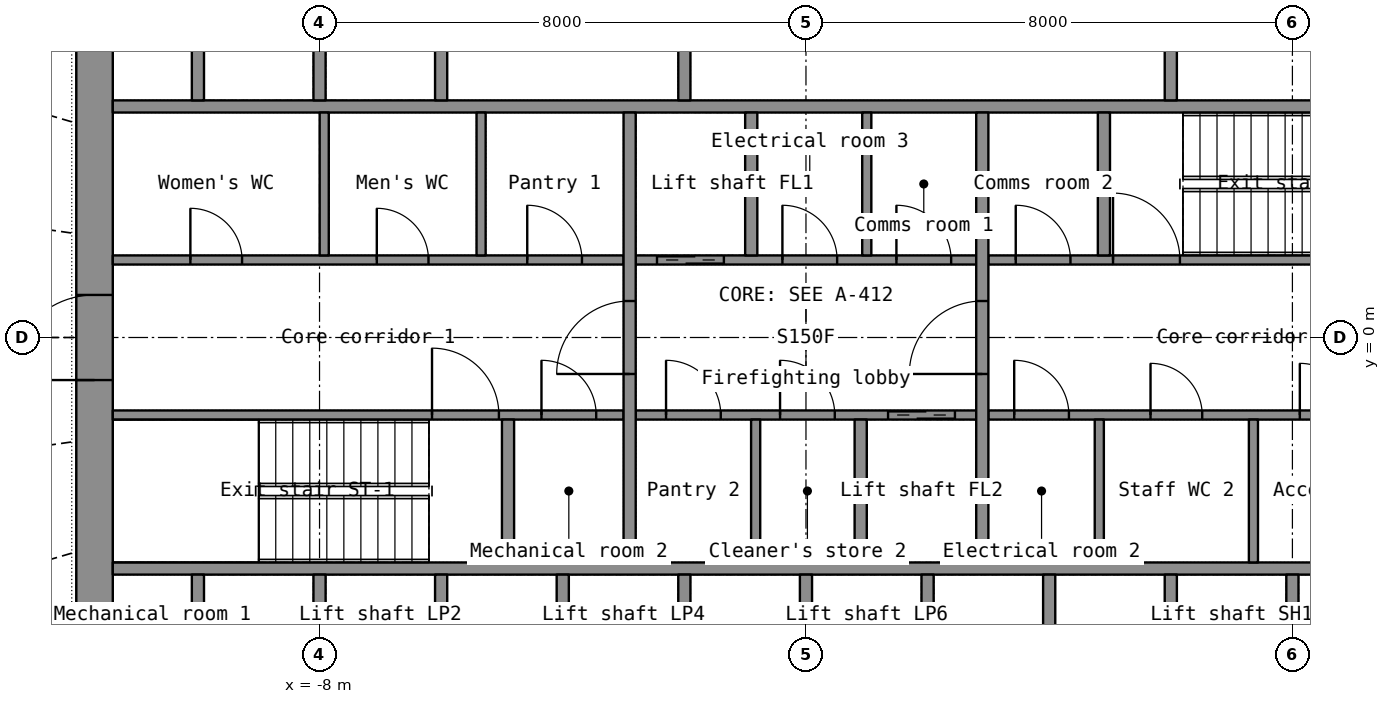
"""IFC4 building model, lengths in metres.
Left out: names, types, materials, properties, quantities, classifications, styles, units other than length and angle.
Written with IfcOpenShell. Run it as: python <this file> out.ifc"""

import sys

from ifc_helpers import new_model, si_unit, direction, frame, frame_2d, origin, place, context, subcontext, project, spatial, rectangle, extrude, element, fill, save


model = new_model("IFC4")
c1 = context("Model", 3, precision=1e-05, world=origin(), true_north=direction((0.0, 1.0)))
c2 = subcontext(c1, "Body", "Model", "MODEL_VIEW")
j1 = project(units=[si_unit("LENGTHUNIT", "METRE"), si_unit("PLANEANGLEUNIT", "RADIAN")], contexts=[c1])
p1 = place(None, origin())
s1 = spatial("IfcSite", under=j1, at=p1, CompositionType="ELEMENT")
p2 = place(p1, origin())
s2 = spatial("IfcBuilding", under=s1, at=p2, CompositionType="ELEMENT")
p3 = place(p2, frame((0.0, 0.0, 81.5)))
s3 = spatial("IfcBuildingStorey", under=s2, at=p3, CompositionType="ELEMENT", Elevation=81.5)
p4 = place(p3, frame((-11.7, -7.2, 0.0), z_axis=(0.0, 0.0, 1.0), x_axis=(0.0, 1.0, 0.0)))
e1 = element("IfcWall", 1, at=p4, inside=s3, PredefinedType="SHEAR", context=c2, shape_type="SweptSolid", body=[
    extrude(rectangle(XDim=14.4, YDim=0.6, at=frame_2d((7.2, 0.0))), origin(), (0.0, 0.0, 1.0), 3.3),
])
p5 = place(p4, frame((6.5, 0.0, 0.0)))
e2 = element("IfcOpeningElement", 2, at=p5, cuts=e1, PredefinedType="OPENING", context=c2, shape_type="SweptSolid", body=[
    extrude(rectangle(XDim=1.4, YDim=2.2, at=frame_2d((0.7, 1.1))), frame((0.0, 0.31, 0.0), z_axis=(0.0, -1.0, 0.0), x_axis=(1.0, 0.0, 0.0)), (0.0, 0.0, 1.0), 0.62),
])
for number, where, z_axis, x_axis in (
    (3, (-11.4, -3.8, 0.0), (0.0, 0.0, 1.0), (1.0, 0.0, 0.0)),
    (4, (-11.4, 3.8, 0.0), (0.0, 0.0, 1.0), (1.0, 0.0, 0.0)),
):
    element("IfcWall", number, at=place(p3, frame(where, z_axis=z_axis, x_axis=x_axis)), inside=s3, PredefinedType="SHEAR", context=c2, shape_type="SweptSolid", body=[
        extrude(rectangle(XDim=22.8, YDim=0.2, at=frame_2d((11.4, 0.0))), origin(), (0.0, 0.0, 1.0), 3.3),
    ])
for number, where, z_axis, x_axis in (
    (5, (-10.0, -6.6, 0.0), (0.0, 0.0, 1.0), (0.0, 1.0, 0.0)),
    (6, (-8.0, -6.6, 0.0), (0.0, 0.0, 1.0), (0.0, 1.0, 0.0)),
    (7, (-6.0, -6.6, 0.0), (0.0, 0.0, 1.0), (0.0, 1.0, 0.0)),
    (8, (-4.0, -6.6, 0.0), (0.0, 0.0, 1.0), (0.0, 1.0, 0.0)),
    (9, (-2.0, -6.6, 0.0), (0.0, 0.0, 1.0), (0.0, 1.0, 0.0)),
    (10, (0.0, -6.6, 0.0), (0.0, 0.0, 1.0), (0.0, 1.0, 0.0)),
    (11, (2.0, -6.6, 0.0), (0.0, 0.0, 1.0), (0.0, 1.0, 0.0)),
    (12, (4.0, -6.6, 0.0), (0.0, 0.0, 1.0), (0.0, 1.0, 0.0)),
    (13, (6.0, -6.6, 0.0), (0.0, 0.0, 1.0), (0.0, 1.0, 0.0)),
    (14, (8.0, -6.6, 0.0), (0.0, 0.0, 1.0), (0.0, 1.0, 0.0)),
    (15, (-10.0, 3.9, 0.0), (0.0, 0.0, 1.0), (0.0, 1.0, 0.0)),
    (16, (-8.0, 3.9, 0.0), (0.0, 0.0, 1.0), (0.0, 1.0, 0.0)),
    (17, (-6.0, 3.9, 0.0), (0.0, 0.0, 1.0), (0.0, 1.0, 0.0)),
):
    element("IfcWall", number, at=place(p3, frame(where, z_axis=z_axis, x_axis=x_axis)), inside=s3, PredefinedType="SHEAR", context=c2, shape_type="SweptSolid", body=[
        extrude(rectangle(XDim=2.7, YDim=0.2, at=frame_2d((1.35, 0.0))), origin(), (0.0, 0.0, 1.0), 3.3),
    ])
for number, where, z_axis, x_axis in (
    (18, (-2.0, 3.9, 0.0), (0.0, 0.0, 1.0), (0.0, 1.0, 0.0)),
    (19, (6.0, 3.9, 0.0), (0.0, 0.0, 1.0), (0.0, 1.0, 0.0)),
):
    element("IfcWall", number, at=place(p3, frame(where, z_axis=z_axis, x_axis=x_axis)), inside=s3, PredefinedType="PARTITIONING", context=c2, shape_type="SweptSolid", body=[
        extrude(rectangle(XDim=2.7, YDim=0.2, at=frame_2d((1.35, 0.0))), origin(), (0.0, 0.0, 1.0), 3.3),
    ])
p6 = place(p3, frame((-11.4, -1.275, 0.0), z_axis=(0.0, 0.0, 1.0), x_axis=(1.0, 0.0, 0.0)))
e20 = element("IfcWall", 20, at=p6, inside=s3, PredefinedType="SHEAR", context=c2, shape_type="SweptSolid", body=[
    extrude(rectangle(XDim=8.4, YDim=0.15, at=frame_2d((4.2, 0.0))), origin(), (0.0, 0.0, 1.0), 3.3),
])
p7 = place(p6, frame((5.25, 0.0, 0.0)))
e21 = element("IfcOpeningElement", 21, at=p7, cuts=e20, PredefinedType="OPENING", context=c2, shape_type="SweptSolid", body=[
    extrude(rectangle(XDim=1.1, YDim=2.15, at=frame_2d((0.55, 1.075))), frame((0.0, 0.085, 0.0), z_axis=(0.0, -1.0, 0.0), x_axis=(1.0, 0.0, 0.0)), (0.0, 0.0, 1.0), 0.17),
])
p8 = place(p6, frame((7.05, 0.0, 0.0)))
e22 = element("IfcOpeningElement", 22, at=p8, cuts=e20, PredefinedType="OPENING", context=c2, shape_type="SweptSolid", body=[
    extrude(rectangle(XDim=0.9, YDim=2.1, at=frame_2d((0.45, 1.05))), frame((0.0, 0.085, 0.0), z_axis=(0.0, -1.0, 0.0), x_axis=(1.0, 0.0, 0.0)), (0.0, 0.0, 1.0), 0.17),
])
p9 = place(p3, frame((-2.8, -1.275, 0.0), z_axis=(0.0, 0.0, 1.0), x_axis=(1.0, 0.0, 0.0)))
e23 = element("IfcWall", 23, at=p9, inside=s3, PredefinedType="SHEAR", context=c2, shape_type="SweptSolid", body=[
    extrude(rectangle(XDim=5.6, YDim=0.15, at=frame_2d((2.8, 0.0))), origin(), (0.0, 0.0, 1.0), 3.3),
])
p10 = place(p9, frame((4.15, 0.0, 0.0)))
e24 = element("IfcOpeningElement", 24, at=p10, cuts=e23, PredefinedType="OPENING", context=c2, shape_type="SweptSolid", body=[
    extrude(rectangle(XDim=1.1, YDim=2.2, at=frame_2d((0.55, 1.1))), frame((0.0, 0.085, 0.0), z_axis=(0.0, -1.0, 0.0), x_axis=(1.0, 0.0, 0.0)), (0.0, 0.0, 1.0), 0.17),
])
p11 = place(p9, frame((0.499, 0.0, 0.0)))
e25 = element("IfcOpeningElement", 25, at=p11, cuts=e23, PredefinedType="OPENING", context=c2, shape_type="SweptSolid", body=[
    extrude(rectangle(XDim=0.9, YDim=2.1, at=frame_2d((0.45, 1.05))), frame((0.0, 0.085, 0.0), z_axis=(0.0, -1.0, 0.0), x_axis=(1.0, 0.0, 0.0)), (0.0, 0.0, 1.0), 0.17),
])
p12 = place(p9, frame((2.374, 0.0, 0.0)))
e26 = element("IfcOpeningElement", 26, at=p12, cuts=e23, PredefinedType="OPENING", context=c2, shape_type="SweptSolid", body=[
    extrude(rectangle(XDim=0.9, YDim=2.1, at=frame_2d((0.45, 1.05))), frame((0.0, 0.085, 0.0), z_axis=(0.0, -1.0, 0.0), x_axis=(1.0, 0.0, 0.0)), (0.0, 0.0, 1.0), 0.17),
])
p13 = place(p3, frame((3.0, -1.275, 0.0), z_axis=(0.0, 0.0, 1.0), x_axis=(1.0, 0.0, 0.0)))
e27 = element("IfcWall", 27, at=p13, inside=s3, PredefinedType="PARTITIONING", context=c2, shape_type="SweptSolid", body=[
    extrude(rectangle(XDim=8.4, YDim=0.15, at=frame_2d((4.2, 0.0))), origin(), (0.0, 0.0, 1.0), 3.3),
])
p14 = place(p13, frame((0.425, 0.0, 0.0)))
e28 = element("IfcOpeningElement", 28, at=p14, cuts=e27, PredefinedType="OPENING", context=c2, shape_type="SweptSolid", body=[
    extrude(rectangle(XDim=0.9, YDim=2.1, at=frame_2d((0.45, 1.05))), frame((0.0, 0.085, 0.0), z_axis=(0.0, -1.0, 0.0), x_axis=(1.0, 0.0, 0.0)), (0.0, 0.0, 1.0), 0.17),
])
p15 = place(p13, frame((2.667, 0.0, 0.0)))
e29 = element("IfcOpeningElement", 29, at=p15, cuts=e27, PredefinedType="OPENING", context=c2, shape_type="SweptSolid", body=[
    extrude(rectangle(XDim=0.85, YDim=2.1, at=frame_2d((0.425, 1.05))), frame((0.0, 0.085, 0.0), z_axis=(0.0, -1.0, 0.0), x_axis=(1.0, 0.0, 0.0)), (0.0, 0.0, 1.0), 0.17),
])
p16 = place(p13, frame((5.122, 0.0, 0.0)))
e30 = element("IfcOpeningElement", 30, at=p16, cuts=e27, PredefinedType="OPENING", context=c2, shape_type="SweptSolid", body=[
    extrude(rectangle(XDim=0.85, YDim=2.1, at=frame_2d((0.425, 1.05))), frame((0.0, 0.085, 0.0), z_axis=(0.0, -1.0, 0.0), x_axis=(1.0, 0.0, 0.0)), (0.0, 0.0, 1.0), 0.17),
])
p17 = place(p13, frame((7.155, 0.0, 0.0)))
e31 = element("IfcOpeningElement", 31, at=p17, cuts=e27, PredefinedType="OPENING", context=c2, shape_type="SweptSolid", body=[
    extrude(rectangle(XDim=0.9, YDim=2.1, at=frame_2d((0.45, 1.05))), frame((0.0, 0.085, 0.0), z_axis=(0.0, -1.0, 0.0), x_axis=(1.0, 0.0, 0.0)), (0.0, 0.0, 1.0), 0.17),
])
p18 = place(p3, frame((-11.4, 1.275, 0.0), z_axis=(0.0, 0.0, 1.0), x_axis=(1.0, 0.0, 0.0)))
e32 = element("IfcWall", 32, at=p18, inside=s3, PredefinedType="PARTITIONING", context=c2, shape_type="SweptSolid", body=[
    extrude(rectangle(XDim=8.4, YDim=0.15, at=frame_2d((4.2, 0.0))), origin(), (0.0, 0.0, 1.0), 3.3),
])
p19 = place(p18, frame((1.276, 0.0, 0.0)))
e33 = element("IfcOpeningElement", 33, at=p19, cuts=e32, PredefinedType="OPENING", context=c2, shape_type="SweptSolid", body=[
    extrude(rectangle(XDim=0.85, YDim=2.1, at=frame_2d((0.425, 1.05))), frame((0.0, 0.085, 0.0), z_axis=(0.0, -1.0, 0.0), x_axis=(1.0, 0.0, 0.0)), (0.0, 0.0, 1.0), 0.17),
])
p20 = place(p18, frame((4.342, 0.0, 0.0)))
e34 = element("IfcOpeningElement", 34, at=p20, cuts=e32, PredefinedType="OPENING", context=c2, shape_type="SweptSolid", body=[
    extrude(rectangle(XDim=0.85, YDim=2.1, at=frame_2d((0.425, 1.05))), frame((0.0, 0.085, 0.0), z_axis=(0.0, -1.0, 0.0), x_axis=(1.0, 0.0, 0.0)), (0.0, 0.0, 1.0), 0.17),
])
p21 = place(p18, frame((6.816, 0.0, 0.0)))
e35 = element("IfcOpeningElement", 35, at=p21, cuts=e32, PredefinedType="OPENING", context=c2, shape_type="SweptSolid", body=[
    extrude(rectangle(XDim=0.9, YDim=2.1, at=frame_2d((0.45, 1.05))), frame((0.0, 0.085, 0.0), z_axis=(0.0, -1.0, 0.0), x_axis=(1.0, 0.0, 0.0)), (0.0, 0.0, 1.0), 0.17),
])
p22 = place(p3, frame((-2.8, 1.275, 0.0), z_axis=(0.0, 0.0, 1.0), x_axis=(1.0, 0.0, 0.0)))
e36 = element("IfcWall", 36, at=p22, inside=s3, PredefinedType="SHEAR", context=c2, shape_type="SweptSolid", body=[
    extrude(rectangle(XDim=5.6, YDim=0.15, at=frame_2d((2.8, 0.0))), origin(), (0.0, 0.0, 1.0), 3.3),
])
p23 = place(p22, frame((0.35, 0.0, 0.0)))
e37 = element("IfcOpeningElement", 37, at=p23, cuts=e36, PredefinedType="OPENING", context=c2, shape_type="SweptSolid", body=[
    extrude(rectangle(XDim=1.1, YDim=2.2, at=frame_2d((0.55, 1.1))), frame((0.0, 0.085, 0.0), z_axis=(0.0, -1.0, 0.0), x_axis=(1.0, 0.0, 0.0)), (0.0, 0.0, 1.0), 0.17),
])
p24 = place(p22, frame((2.413, 0.0, 0.0)))
e38 = element("IfcOpeningElement", 38, at=p24, cuts=e36, PredefinedType="OPENING", context=c2, shape_type="SweptSolid", body=[
    extrude(rectangle(XDim=0.9, YDim=2.1, at=frame_2d((0.45, 1.05))), frame((0.0, 0.085, 0.0), z_axis=(0.0, -1.0, 0.0), x_axis=(1.0, 0.0, 0.0)), (0.0, 0.0, 1.0), 0.17),
])
p25 = place(p22, frame((4.288, 0.0, 0.0)))
e39 = element("IfcOpeningElement", 39, at=p25, cuts=e36, PredefinedType="OPENING", context=c2, shape_type="SweptSolid", body=[
    extrude(rectangle(XDim=0.9, YDim=2.1, at=frame_2d((0.45, 1.05))), frame((0.0, 0.085, 0.0), z_axis=(0.0, -1.0, 0.0), x_axis=(1.0, 0.0, 0.0)), (0.0, 0.0, 1.0), 0.17),
])
p26 = place(p3, frame((3.0, 1.275, 0.0), z_axis=(0.0, 0.0, 1.0), x_axis=(1.0, 0.0, 0.0)))
e40 = element("IfcWall", 40, at=p26, inside=s3, PredefinedType="SHEAR", context=c2, shape_type="SweptSolid", body=[
    extrude(rectangle(XDim=8.4, YDim=0.15, at=frame_2d((4.2, 0.0))), origin(), (0.0, 0.0, 1.0), 3.3),
])
p27 = place(p26, frame((2.05, 0.0, 0.0)))
e41 = element("IfcOpeningElement", 41, at=p27, cuts=e40, PredefinedType="OPENING", context=c2, shape_type="SweptSolid", body=[
    extrude(rectangle(XDim=1.1, YDim=2.15, at=frame_2d((0.55, 1.075))), frame((0.0, 0.085, 0.0), z_axis=(0.0, -1.0, 0.0), x_axis=(1.0, 0.0, 0.0)), (0.0, 0.0, 1.0), 0.17),
])
p28 = place(p26, frame((0.45, 0.0, 0.0)))
e42 = element("IfcOpeningElement", 42, at=p28, cuts=e40, PredefinedType="OPENING", context=c2, shape_type="SweptSolid", body=[
    extrude(rectangle(XDim=0.9, YDim=2.1, at=frame_2d((0.45, 1.05))), frame((0.0, 0.085, 0.0), z_axis=(0.0, -1.0, 0.0), x_axis=(1.0, 0.0, 0.0)), (0.0, 0.0, 1.0), 0.17),
])
p29 = place(p3, frame((-2.9, -3.7, 0.0), z_axis=(0.0, 0.0, 1.0), x_axis=(0.0, 1.0, 0.0)))
e43 = element("IfcWall", 43, at=p29, inside=s3, PredefinedType="SHEAR", context=c2, shape_type="SweptSolid", body=[
    extrude(rectangle(XDim=7.4, YDim=0.2, at=frame_2d((3.7, 0.0))), origin(), (0.0, 0.0, 1.0), 3.3),
])
p30 = place(p29, frame((3.1, 0.0, 0.0)))
e44 = element("IfcOpeningElement", 44, at=p30, cuts=e43, PredefinedType="OPENING", context=c2, shape_type="SweptSolid", body=[
    extrude(rectangle(XDim=1.2, YDim=2.2, at=frame_2d((0.6, 1.1))), frame((0.0, 0.11, 0.0), z_axis=(0.0, -1.0, 0.0), x_axis=(1.0, 0.0, 0.0)), (0.0, 0.0, 1.0), 0.22),
])
p31 = place(p3, frame((2.9, -3.7, 0.0), z_axis=(0.0, 0.0, 1.0), x_axis=(0.0, 1.0, 0.0)))
e45 = element("IfcWall", 45, at=p31, inside=s3, PredefinedType="SHEAR", context=c2, shape_type="SweptSolid", body=[
    extrude(rectangle(XDim=7.4, YDim=0.2, at=frame_2d((3.7, 0.0))), origin(), (0.0, 0.0, 1.0), 3.3),
])
p32 = place(p31, frame((3.1, 0.0, 0.0)))
e46 = element("IfcOpeningElement", 46, at=p32, cuts=e45, PredefinedType="OPENING", context=c2, shape_type="SweptSolid", body=[
    extrude(rectangle(XDim=1.2, YDim=2.2, at=frame_2d((0.6, 1.1))), frame((0.0, 0.11, 0.0), z_axis=(0.0, -1.0, 0.0), x_axis=(1.0, 0.0, 0.0)), (0.0, 0.0, 1.0), 0.22),
])
for number, where, z_axis, x_axis in (
    (47, (-0.9, 1.35, 0.0), (0.0, 0.0, 1.0), (0.0, 1.0, 0.0)),
    (48, (0.9, -3.7, 0.0), (0.0, 0.0, 1.0), (0.0, 1.0, 0.0)),
    (49, (-4.9, -3.7, 0.0), (0.0, 0.0, 1.0), (0.0, 1.0, 0.0)),
    (50, (4.9, 1.35, 0.0), (0.0, 0.0, 1.0), (0.0, 1.0, 0.0)),
):
    element("IfcWall", number, at=place(p3, frame(where, z_axis=z_axis, x_axis=x_axis)), inside=s3, PredefinedType="SHEAR", context=c2, shape_type="SweptSolid", body=[
        extrude(rectangle(XDim=2.35, YDim=0.2, at=frame_2d((1.175, 0.0))), origin(), (0.0, 0.0, 1.0), 3.3),
    ])
for number, where, z_axis, x_axis in (
    (51, (-7.923, 1.35, 0.0), (0.0, 0.0, 1.0), (0.0, 1.0, 0.0)),
    (52, (-5.343, 1.35, 0.0), (0.0, 0.0, 1.0), (0.0, 1.0, 0.0)),
    (53, (4.824, -3.7, 0.0), (0.0, 0.0, 1.0), (0.0, 1.0, 0.0)),
    (54, (7.359, -3.7, 0.0), (0.0, 0.0, 1.0), (0.0, 1.0, 0.0)),
    (55, (1.0, 1.35, 0.0), (0.0, 0.0, 1.0), (0.0, 1.0, 0.0)),
    (56, (-0.827, -3.7, 0.0), (0.0, 0.0, 1.0), (0.0, 1.0, 0.0)),
):
    element("IfcWall", number, at=place(p3, frame(where, z_axis=z_axis, x_axis=x_axis)), inside=s3, PredefinedType="PARTITIONING", context=c2, shape_type="SweptSolid", body=[
        extrude(rectangle(XDim=2.35, YDim=0.15, at=frame_2d((1.175, 0.0))), origin(), (0.0, 0.0, 1.0), 3.3),
    ])
p33 = place(p5, origin())
e57 = element("IfcDoor", 57, at=p33, inside=s3, OperationType="DOUBLE_DOOR_SINGLE_SWING", PredefinedType="DOOR", context=c2, shape_type="SweptSolid", body=[
    extrude(rectangle(XDim=1.4, YDim=2.2, at=frame_2d((0.7, 1.1))), frame((0.0, 0.025, 0.0), z_axis=(0.0, -1.0, 0.0), x_axis=(1.0, 0.0, 0.0)), (0.0, 0.0, 1.0), 0.05),
])
fill(e2, e57)
p34 = place(p30, origin())
e58 = element("IfcDoor", 58, at=p34, inside=s3, OperationType="SINGLE_SWING_LEFT", PredefinedType="DOOR", context=c2, shape_type="SweptSolid", body=[
    extrude(rectangle(XDim=1.2, YDim=2.2, at=frame_2d((0.6, 1.1))), frame((0.0, 0.025, 0.0), z_axis=(0.0, -1.0, 0.0), x_axis=(1.0, 0.0, 0.0)), (0.0, 0.0, 1.0), 0.05),
])
fill(e44, e58)
p35 = place(p32, origin())
e59 = element("IfcDoor", 59, at=p35, inside=s3, OperationType="SINGLE_SWING_LEFT", PredefinedType="DOOR", context=c2, shape_type="SweptSolid", body=[
    extrude(rectangle(XDim=1.2, YDim=2.2, at=frame_2d((0.6, 1.1))), frame((0.0, 0.025, 0.0), z_axis=(0.0, -1.0, 0.0), x_axis=(1.0, 0.0, 0.0)), (0.0, 0.0, 1.0), 0.05),
])
fill(e46, e59)
p36 = place(p23, origin())
e60 = element("IfcDoor", 60, at=p36, inside=s3, OperationType="DOUBLE_DOOR_SLIDING", PredefinedType="DOOR", context=c2, shape_type="SweptSolid", body=[
    extrude(rectangle(XDim=1.1, YDim=2.2, at=frame_2d((0.55, 1.1))), frame((0.0, 0.025, 0.0), z_axis=(0.0, -1.0, 0.0), x_axis=(1.0, 0.0, 0.0)), (0.0, 0.0, 1.0), 0.05),
])
fill(e37, e60)
p37 = place(p10, origin())
e61 = element("IfcDoor", 61, at=p37, inside=s3, OperationType="DOUBLE_DOOR_SLIDING", PredefinedType="DOOR", context=c2, shape_type="SweptSolid", body=[
    extrude(rectangle(XDim=1.1, YDim=2.2, at=frame_2d((0.55, 1.1))), frame((0.0, 0.025, 0.0), z_axis=(0.0, -1.0, 0.0), x_axis=(1.0, 0.0, 0.0)), (0.0, 0.0, 1.0), 0.05),
])
fill(e24, e61)
p38 = place(p7, origin())
e62 = element("IfcDoor", 62, at=p38, inside=s3, OperationType="SINGLE_SWING_LEFT", PredefinedType="DOOR", context=c2, shape_type="SweptSolid", body=[
    extrude(rectangle(XDim=1.1, YDim=2.15, at=frame_2d((0.55, 1.075))), frame((0.0, 0.025, 0.0), z_axis=(0.0, -1.0, 0.0), x_axis=(1.0, 0.0, 0.0)), (0.0, 0.0, 1.0), 0.05),
])
fill(e21, e62)
p39 = place(p27, origin())
e63 = element("IfcDoor", 63, at=p39, inside=s3, OperationType="SINGLE_SWING_LEFT", PredefinedType="DOOR", context=c2, shape_type="SweptSolid", body=[
    extrude(rectangle(XDim=1.1, YDim=2.15, at=frame_2d((0.55, 1.075))), frame((0.0, 0.025, 0.0), z_axis=(0.0, -1.0, 0.0), x_axis=(1.0, 0.0, 0.0)), (0.0, 0.0, 1.0), 0.05),
])
fill(e41, e63)
p40 = place(p19, origin())
e64 = element("IfcDoor", 64, at=p40, inside=s3, OperationType="SINGLE_SWING_LEFT", PredefinedType="DOOR", context=c2, shape_type="SweptSolid", body=[
    extrude(rectangle(XDim=0.85, YDim=2.1, at=frame_2d((0.425, 1.05))), frame((0.0, 0.025, 0.0), z_axis=(0.0, -1.0, 0.0), x_axis=(1.0, 0.0, 0.0)), (0.0, 0.0, 1.0), 0.05),
])
fill(e33, e64)
p41 = place(p20, origin())
e65 = element("IfcDoor", 65, at=p41, inside=s3, OperationType="SINGLE_SWING_LEFT", PredefinedType="DOOR", context=c2, shape_type="SweptSolid", body=[
    extrude(rectangle(XDim=0.85, YDim=2.1, at=frame_2d((0.425, 1.05))), frame((0.0, 0.025, 0.0), z_axis=(0.0, -1.0, 0.0), x_axis=(1.0, 0.0, 0.0)), (0.0, 0.0, 1.0), 0.05),
])
fill(e34, e65)
p42 = place(p21, origin())
e66 = element("IfcDoor", 66, at=p42, inside=s3, OperationType="SINGLE_SWING_LEFT", PredefinedType="DOOR", context=c2, shape_type="SweptSolid", body=[
    extrude(rectangle(XDim=0.9, YDim=2.1, at=frame_2d((0.45, 1.05))), frame((0.0, 0.025, 0.0), z_axis=(0.0, -1.0, 0.0), x_axis=(1.0, 0.0, 0.0)), (0.0, 0.0, 1.0), 0.05),
])
fill(e35, e66)
p43 = place(p14, origin())
e67 = element("IfcDoor", 67, at=p43, inside=s3, OperationType="SINGLE_SWING_LEFT", PredefinedType="DOOR", context=c2, shape_type="SweptSolid", body=[
    extrude(rectangle(XDim=0.9, YDim=2.1, at=frame_2d((0.45, 1.05))), frame((0.0, 0.025, 0.0), z_axis=(0.0, -1.0, 0.0), x_axis=(1.0, 0.0, 0.0)), (0.0, 0.0, 1.0), 0.05),
])
fill(e28, e67)
p44 = place(p15, origin())
e68 = element("IfcDoor", 68, at=p44, inside=s3, OperationType="SINGLE_SWING_LEFT", PredefinedType="DOOR", context=c2, shape_type="SweptSolid", body=[
    extrude(rectangle(XDim=0.85, YDim=2.1, at=frame_2d((0.425, 1.05))), frame((0.0, 0.025, 0.0), z_axis=(0.0, -1.0, 0.0), x_axis=(1.0, 0.0, 0.0)), (0.0, 0.0, 1.0), 0.05),
])
fill(e29, e68)
p45 = place(p16, origin())
e69 = element("IfcDoor", 69, at=p45, inside=s3, OperationType="SINGLE_SWING_LEFT", PredefinedType="DOOR", context=c2, shape_type="SweptSolid", body=[
    extrude(rectangle(XDim=0.85, YDim=2.1, at=frame_2d((0.425, 1.05))), frame((0.0, 0.025, 0.0), z_axis=(0.0, -1.0, 0.0), x_axis=(1.0, 0.0, 0.0)), (0.0, 0.0, 1.0), 0.05),
])
fill(e30, e69)
p46 = place(p24, origin())
e70 = element("IfcDoor", 70, at=p46, inside=s3, OperationType="SINGLE_SWING_LEFT", PredefinedType="DOOR", context=c2, shape_type="SweptSolid", body=[
    extrude(rectangle(XDim=0.9, YDim=2.1, at=frame_2d((0.45, 1.05))), frame((0.0, 0.025, 0.0), z_axis=(0.0, -1.0, 0.0), x_axis=(1.0, 0.0, 0.0)), (0.0, 0.0, 1.0), 0.05),
])
fill(e38, e70)
p47 = place(p25, origin())
e71 = element("IfcDoor", 71, at=p47, inside=s3, OperationType="SINGLE_SWING_LEFT", PredefinedType="DOOR", context=c2, shape_type="SweptSolid", body=[
    extrude(rectangle(XDim=0.9, YDim=2.1, at=frame_2d((0.45, 1.05))), frame((0.0, 0.025, 0.0), z_axis=(0.0, -1.0, 0.0), x_axis=(1.0, 0.0, 0.0)), (0.0, 0.0, 1.0), 0.05),
])
fill(e39, e71)
p48 = place(p11, origin())
e72 = element("IfcDoor", 72, at=p48, inside=s3, OperationType="SINGLE_SWING_LEFT", PredefinedType="DOOR", context=c2, shape_type="SweptSolid", body=[
    extrude(rectangle(XDim=0.9, YDim=2.1, at=frame_2d((0.45, 1.05))), frame((0.0, 0.025, 0.0), z_axis=(0.0, -1.0, 0.0), x_axis=(1.0, 0.0, 0.0)), (0.0, 0.0, 1.0), 0.05),
])
fill(e25, e72)
p49 = place(p12, origin())
e73 = element("IfcDoor", 73, at=p49, inside=s3, OperationType="SINGLE_SWING_LEFT", PredefinedType="DOOR", context=c2, shape_type="SweptSolid", body=[
    extrude(rectangle(XDim=0.9, YDim=2.1, at=frame_2d((0.45, 1.05))), frame((0.0, 0.025, 0.0), z_axis=(0.0, -1.0, 0.0), x_axis=(1.0, 0.0, 0.0)), (0.0, 0.0, 1.0), 0.05),
])
fill(e26, e73)
p50 = place(p28, origin())
e74 = element("IfcDoor", 74, at=p50, inside=s3, OperationType="SINGLE_SWING_LEFT", PredefinedType="DOOR", context=c2, shape_type="SweptSolid", body=[
    extrude(rectangle(XDim=0.9, YDim=2.1, at=frame_2d((0.45, 1.05))), frame((0.0, 0.025, 0.0), z_axis=(0.0, -1.0, 0.0), x_axis=(1.0, 0.0, 0.0)), (0.0, 0.0, 1.0), 0.05),
])
fill(e42, e74)
p51 = place(p8, origin())
e75 = element("IfcDoor", 75, at=p51, inside=s3, OperationType="SINGLE_SWING_LEFT", PredefinedType="DOOR", context=c2, shape_type="SweptSolid", body=[
    extrude(rectangle(XDim=0.9, YDim=2.1, at=frame_2d((0.45, 1.05))), frame((0.0, 0.025, 0.0), z_axis=(0.0, -1.0, 0.0), x_axis=(1.0, 0.0, 0.0)), (0.0, 0.0, 1.0), 0.05),
])
fill(e22, e75)
save(model, sys.argv[1])
